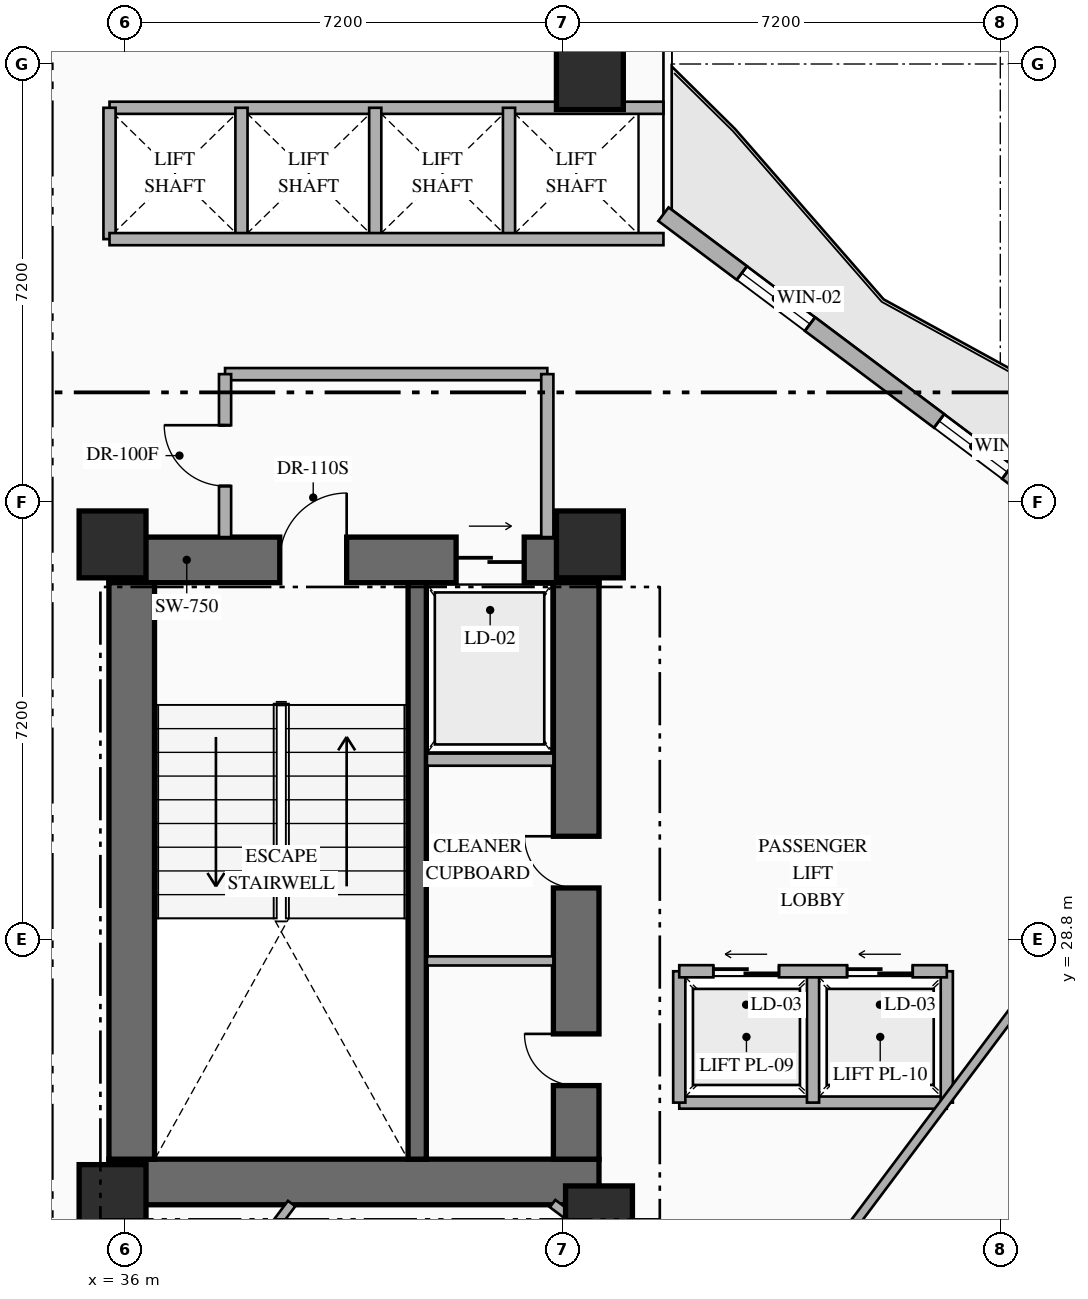
"""IFC4 building model, lengths in metres.
Left out: names, types, materials, properties, quantities, classifications, styles, units other than length and angle.
Written with IfcOpenShell. Run it as: python <this file> out.ifc"""

import sys

from ifc_helpers import new_model, si_unit, direction, frame, frame_2d, origin, origin_2d, place, context, subcontext, project, spatial, rectangle, extrude, element, fill, save


model = new_model("IFC4")
c1 = context("Model", 3, precision=1e-05, world=origin(), true_north=direction((0.0, 1.0)))
c2 = subcontext(c1, "Body", "Model", "MODEL_VIEW")
j1 = project(units=[si_unit("LENGTHUNIT", "METRE"), si_unit("PLANEANGLEUNIT", "RADIAN")], contexts=[c1])
p1 = place(None, origin())
s1 = spatial("IfcSite", under=j1, at=p1, CompositionType="ELEMENT")
p2 = place(p1, origin())
s2 = spatial("IfcBuilding", under=s1, at=p2, CompositionType="ELEMENT")
p3 = place(p2, frame((0.0, 0.0, 66.75)))
s3 = spatial("IfcBuildingStorey", under=s2, at=p3, CompositionType="ELEMENT", Elevation=66.75)
p4 = place(p3, frame((35.74, 24.815, 0.0), z_axis=(0.0, 0.0, 1.0), x_axis=(1.0, 0.0, 0.0)))
e1 = element("IfcWall", 1, at=p4, inside=s3, PredefinedType="SHEAR", context=c2, shape_type="SweptSolid", body=[
    extrude(rectangle(XDim=8.06, YDim=0.75, at=frame_2d((4.03, 0.0))), origin(), (0.0, 0.0, 1.0), 3.35),
])
p5 = place(p3, frame((35.74, 35.045, 0.0), z_axis=(0.0, 0.0, 1.0), x_axis=(1.0, 0.0, 0.0)))
e2 = element("IfcWall", 2, at=p5, inside=s3, PredefinedType="SHEAR", context=c2, shape_type="SweptSolid", body=[
    extrude(rectangle(XDim=8.06, YDim=0.75, at=frame_2d((4.03, 0.0))), origin(), (0.0, 0.0, 1.0), 3.35),
])
p6 = place(p5, frame((2.81, 0.0, 0.0)))
e3 = element("IfcOpeningElement", 3, at=p6, cuts=e2, PredefinedType="OPENING", context=c2, shape_type="SweptSolid", body=[
    extrude(rectangle(XDim=1.1, YDim=2.2, at=frame_2d((0.55, 1.1))), frame((0.0, 0.385, 0.0), z_axis=(0.0, -1.0, 0.0), x_axis=(1.0, 0.0, 0.0)), (0.0, 0.0, 1.0), 0.77),
])
p7 = place(p5, frame((5.71, 0.0, 0.0)))
e4 = element("IfcOpeningElement", 4, at=p7, cuts=e2, PredefinedType="OPENING", context=c2, shape_type="SweptSolid", body=[
    extrude(rectangle(XDim=1.12, YDim=2.15, at=frame_2d((0.56, 1.075))), frame((0.0, 0.385, 0.0), z_axis=(0.0, -1.0, 0.0), x_axis=(1.0, 0.0, 0.0)), (0.0, 0.0, 1.0), 0.77),
])
p8 = place(p3, frame((36.115, 25.19, 0.0), z_axis=(0.0, 0.0, 1.0), x_axis=(0.0, 1.0, 0.0)))
e5 = element("IfcWall", 5, at=p8, inside=s3, PredefinedType="SHEAR", context=c2, shape_type="SweptSolid", body=[
    extrude(rectangle(XDim=9.48, YDim=0.75, at=frame_2d((4.74, 0.0))), origin(), (0.0, 0.0, 1.0), 3.35),
])
p9 = place(p3, frame((43.425, 25.19, 0.0), z_axis=(0.0, 0.0, 1.0), x_axis=(0.0, 1.0, 0.0)))
e6 = element("IfcWall", 6, at=p9, inside=s3, PredefinedType="SHEAR", context=c2, shape_type="SweptSolid", body=[
    extrude(rectangle(XDim=9.48, YDim=0.75, at=frame_2d((4.74, 0.0))), origin(), (0.0, 0.0, 1.0), 3.35),
])
p10 = place(p9, frame((1.21, 0.0, 0.0)))
e7 = element("IfcOpeningElement", 7, at=p10, cuts=e6, PredefinedType="OPENING", context=c2, shape_type="SweptSolid", body=[
    extrude(rectangle(XDim=0.85, YDim=2.08, at=frame_2d((0.425, 1.04))), frame((0.0, 0.385, 0.0), z_axis=(0.0, -1.0, 0.0), x_axis=(1.0, 0.0, 0.0)), (0.0, 0.0, 1.0), 0.77),
])
p11 = place(p9, frame((4.46, 0.0, 0.0)))
e8 = element("IfcOpeningElement", 8, at=p11, cuts=e6, PredefinedType="OPENING", context=c2, shape_type="SweptSolid", body=[
    extrude(rectangle(XDim=0.85, YDim=2.08, at=frame_2d((0.425, 1.04))), frame((0.0, 0.385, 0.0), z_axis=(0.0, -1.0, 0.0), x_axis=(1.0, 0.0, 0.0)), (0.0, 0.0, 1.0), 0.77),
])
p12 = place(p3, frame((40.81, 25.19, 0.0), z_axis=(0.0, 0.0, 1.0), x_axis=(0.0, 1.0, 0.0)))
e9 = element("IfcWall", 9, at=p12, inside=s3, PredefinedType="SHEAR", context=c2, shape_type="SweptSolid", body=[
    extrude(rectangle(XDim=9.48, YDim=0.3, at=frame_2d((4.74, 0.0))), origin(), (0.0, 0.0, 1.0), 3.35),
])
for number, where, z_axis, x_axis in (
    (10, (35.8, 24.55, 0.0), (0.0, 0.0, 1.0), (1.0, 0.0, 0.0)),
    (11, (43.8, 24.2, 0.0), (0.0, 0.0, 1.0), (1.0, 0.0, 0.0)),
    (12, (35.8, 35.3, 0.0), (0.0, 0.0, 1.0), (1.0, 0.0, 0.0)),
    (13, (43.65, 35.3, 0.0), (0.0, 0.0, 1.0), (1.0, 0.0, 0.0)),
    (14, (43.65, 43.0, 0.0), (0.0, 0.0, 1.0), (1.0, 0.0, 0.0)),
):
    element("IfcColumn", number, at=place(p3, frame(where, z_axis=z_axis, x_axis=x_axis)), inside=s3, PredefinedType="COLUMN", context=c2, shape_type="SweptSolid", body=[
        extrude(rectangle(XDim=1.1, YDim=1.1, at=origin_2d()), origin(), (0.0, 0.0, 1.0), 3.35),
    ])
p13 = place(p3, frame((44.86, 40.73, 0.0), z_axis=(0.0, 0.0, 1.0), x_axis=(0.800006902154, -0.599990797017, 0.0)))
e15 = element("IfcWall", 15, at=p13, inside=s3, PredefinedType="STANDARD", context=c2, shape_type="SweptSolid", body=[
    extrude(rectangle(XDim=29.712, YDim=0.28, at=frame_2d((14.856, 0.0))), origin(), (0.0, 0.0, 1.0), 3.09),
])
p14 = place(p13, frame((14.249, 0.0, 0.0)))
e16 = element("IfcOpeningElement", 16, at=p14, cuts=e15, PredefinedType="OPENING", context=c2, shape_type="SweptSolid", body=[
    extrude(rectangle(XDim=1.1, YDim=2.2, at=frame_2d((0.55, 1.1))), frame((0.0, 0.15, 0.0), z_axis=(0.0, -1.0, 0.0), x_axis=(1.0, 0.0, 0.0)), (0.0, 0.0, 1.0), 0.3),
])
p15 = place(p13, frame((1.612, 0.0, 0.85)))
e17 = element("IfcOpeningElement", 17, at=p15, cuts=e15, PredefinedType="OPENING", context=c2, shape_type="SweptSolid", body=[
    extrude(rectangle(XDim=1.4, YDim=1.8, at=frame_2d((0.7, 0.9))), frame((0.0, 0.15, 0.0), z_axis=(0.0, -1.0, 0.0), x_axis=(1.0, 0.0, 0.0)), (0.0, 0.0, 1.0), 0.3),
])
p16 = place(p13, frame((5.667, 0.0, 0.85)))
e18 = element("IfcOpeningElement", 18, at=p16, cuts=e15, PredefinedType="OPENING", context=c2, shape_type="SweptSolid", body=[
    extrude(rectangle(XDim=1.4, YDim=1.8, at=frame_2d((0.7, 0.9))), frame((0.0, 0.15, 0.0), z_axis=(0.0, -1.0, 0.0), x_axis=(1.0, 0.0, 0.0)), (0.0, 0.0, 1.0), 0.3),
])
p17 = place(p13, frame((9.912, 0.0, 0.85)))
e19 = element("IfcOpeningElement", 19, at=p17, cuts=e15, PredefinedType="OPENING", context=c2, shape_type="SweptSolid", body=[
    extrude(rectangle(XDim=1.4, YDim=1.8, at=frame_2d((0.7, 0.9))), frame((0.0, 0.15, 0.0), z_axis=(0.0, -1.0, 0.0), x_axis=(1.0, 0.0, 0.0)), (0.0, 0.0, 1.0), 0.3),
])
p18 = place(p13, frame((19.743, 0.0, 0.85)))
e20 = element("IfcOpeningElement", 20, at=p18, cuts=e15, PredefinedType="OPENING", context=c2, shape_type="SweptSolid", body=[
    extrude(rectangle(XDim=1.4, YDim=1.8, at=frame_2d((0.7, 0.9))), frame((0.0, 0.15, 0.0), z_axis=(0.0, -1.0, 0.0), x_axis=(1.0, 0.0, 0.0)), (0.0, 0.0, 1.0), 0.3),
])
p19 = place(p13, frame((22.645, 0.0, 0.85)))
e21 = element("IfcOpeningElement", 21, at=p19, cuts=e15, PredefinedType="OPENING", context=c2, shape_type="SweptSolid", body=[
    extrude(rectangle(XDim=1.4, YDim=1.8, at=frame_2d((0.7, 0.9))), frame((0.0, 0.15, 0.0), z_axis=(0.0, -1.0, 0.0), x_axis=(1.0, 0.0, 0.0)), (0.0, 0.0, 1.0), 0.3),
])
p20 = place(p13, frame((26.7, 0.0, 0.85)))
e22 = element("IfcOpeningElement", 22, at=p20, cuts=e15, PredefinedType="OPENING", context=c2, shape_type="SweptSolid", body=[
    extrude(rectangle(XDim=1.4, YDim=1.8, at=frame_2d((0.7, 0.9))), frame((0.0, 0.15, 0.0), z_axis=(0.0, -1.0, 0.0), x_axis=(1.0, 0.0, 0.0)), (0.0, 0.0, 1.0), 0.3),
])
p21 = place(p3, frame((40.97, 31.76, 0.0), z_axis=(0.0, 0.0, 1.0), x_axis=(1.0, 0.0, 0.0)))
e23 = element("IfcWall", 23, at=p21, inside=s3, PredefinedType="STANDARD", context=c2, shape_type="SweptSolid", body=[
    extrude(rectangle(XDim=2.08, YDim=0.2, at=frame_2d((1.04, 0.0))), origin(), (0.0, 0.0, 1.0), 3.09),
])
p22 = place(p3, frame((40.97, 28.45, 0.0), z_axis=(0.0, 0.0, 1.0), x_axis=(1.0, 0.0, 0.0)))
e24 = element("IfcWall", 24, at=p22, inside=s3, PredefinedType="PARTITIONING", context=c2, shape_type="SweptSolid", body=[
    extrude(rectangle(XDim=2.08, YDim=0.15, at=frame_2d((1.04, 0.0))), origin(), (0.0, 0.0, 1.0), 3.09),
])
p23 = place(p3, frame((37.65, 38.1, 0.0), z_axis=(0.0, 0.0, 1.0), x_axis=(1.0, 0.0, 0.0)))
e25 = element("IfcWall", 25, at=p23, inside=s3, PredefinedType="STANDARD", context=c2, shape_type="SweptSolid", body=[
    extrude(rectangle(XDim=5.3, YDim=0.2, at=frame_2d((2.65, 0.0))), origin(), (0.0, 0.0, 1.0), 3.09),
])
p24 = place(p3, frame((42.95, 35.42, 0.0), z_axis=(0.0, 0.0, 1.0), x_axis=(0.0, 1.0, 0.0)))
e26 = element("IfcWall", 26, at=p24, inside=s3, PredefinedType="STANDARD", context=c2, shape_type="SweptSolid", body=[
    extrude(rectangle(XDim=2.68, YDim=0.2, at=frame_2d((1.34, 0.0))), origin(), (0.0, 0.0, 1.0), 3.09),
])
p25 = place(p3, frame((37.65, 35.42, 0.0), z_axis=(0.0, 0.0, 1.0), x_axis=(0.0, 1.0, 0.0)))
e27 = element("IfcWall", 27, at=p25, inside=s3, PredefinedType="STANDARD", context=c2, shape_type="SweptSolid", body=[
    extrude(rectangle(XDim=2.68, YDim=0.2, at=frame_2d((1.34, 0.0))), origin(), (0.0, 0.0, 1.0), 3.09),
])
p26 = place(p25, frame((0.84, 0.0, 0.0)))
e28 = element("IfcOpeningElement", 28, at=p26, cuts=e27, PredefinedType="OPENING", context=c2, shape_type="SweptSolid", body=[
    extrude(rectangle(XDim=1.0, YDim=2.2, at=frame_2d((0.5, 1.1))), frame((0.0, 0.11, 0.0), z_axis=(0.0, -1.0, 0.0), x_axis=(1.0, 0.0, 0.0)), (0.0, 0.0, 1.0), 0.22),
])
p27 = place(p3, frame((35.75, 42.48, 0.0), z_axis=(0.0, 0.0, 1.0), x_axis=(1.0, 0.0, 0.0)))
e29 = element("IfcWall", 29, at=p27, inside=s3, PredefinedType="STANDARD", context=c2, shape_type="SweptSolid", body=[
    extrude(rectangle(XDim=9.11, YDim=0.2, at=frame_2d((4.555, 0.0))), origin(), (0.0, 0.0, 1.0), 3.09),
])
for number, where, z_axis, x_axis in (
    (30, (35.75, 40.32, 0.0), (0.0, 0.0, 1.0), (0.0, 1.0, 0.0)),
    (31, (37.92, 40.32, 0.0), (0.0, 0.0, 1.0), (0.0, 1.0, 0.0)),
    (32, (40.12, 40.32, 0.0), (0.0, 0.0, 1.0), (0.0, 1.0, 0.0)),
    (33, (42.32, 40.32, 0.0), (0.0, 0.0, 1.0), (0.0, 1.0, 0.0)),
):
    element("IfcWall", number, at=place(p3, frame(where, z_axis=z_axis, x_axis=x_axis)), inside=s3, PredefinedType="STANDARD", context=c2, shape_type="SweptSolid", body=[
        extrude(rectangle(XDim=2.16, YDim=0.2, at=frame_2d((1.08, 0.0))), origin(), (0.0, 0.0, 1.0), 3.09),
    ])
p28 = place(p3, frame((35.75, 40.32, 0.0), z_axis=(0.0, 0.0, 1.0), x_axis=(1.0, 0.0, 0.0)))
e34 = element("IfcWall", 34, at=p28, inside=s3, PredefinedType="STANDARD", context=c2, shape_type="SweptSolid", body=[
    extrude(rectangle(XDim=9.11, YDim=0.2, at=frame_2d((4.555, 0.0))), origin(), (0.0, 0.0, 1.0), 3.09),
])
p29 = place(p3, frame((45.12, 26.12, 0.0), z_axis=(0.0, 0.0, 1.0), x_axis=(1.0, 0.0, 0.0)))
e35 = element("IfcWall", 35, at=p29, inside=s3, PredefinedType="STANDARD", context=c2, shape_type="SweptSolid", body=[
    extrude(rectangle(XDim=4.4, YDim=0.2, at=frame_2d((2.2, 0.0))), origin(), (0.0, 0.0, 1.0), 3.09),
])
for number, where, z_axis, x_axis in (
    (36, (45.12, 26.12, 0.0), (0.0, 0.0, 1.0), (0.0, 1.0, 0.0)),
    (37, (49.52, 26.12, 0.0), (0.0, 0.0, 1.0), (0.0, 1.0, 0.0)),
    (38, (47.32, 26.12, 0.0), (0.0, 0.0, 1.0), (0.0, 1.0, 0.0)),
):
    element("IfcWall", number, at=place(p3, frame(where, z_axis=z_axis, x_axis=x_axis)), inside=s3, PredefinedType="STANDARD", context=c2, shape_type="SweptSolid", body=[
        extrude(rectangle(XDim=2.16, YDim=0.2, at=frame_2d((1.08, 0.0))), origin(), (0.0, 0.0, 1.0), 3.09),
    ])
p30 = place(p3, frame((45.12, 28.28, 0.0), z_axis=(0.0, 0.0, 1.0), x_axis=(1.0, 0.0, 0.0)))
e39 = element("IfcWall", 39, at=p30, inside=s3, PredefinedType="STANDARD", context=c2, shape_type="SweptSolid", body=[
    extrude(rectangle(XDim=4.4, YDim=0.2, at=frame_2d((2.2, 0.0))), origin(), (0.0, 0.0, 1.0), 3.09),
])
p31 = place(p30, frame((0.56, 0.0, 0.0)))
e40 = element("IfcOpeningElement", 40, at=p31, cuts=e39, PredefinedType="OPENING", context=c2, shape_type="SweptSolid", body=[
    extrude(rectangle(XDim=1.08, YDim=2.15, at=frame_2d((0.54, 1.075))), frame((0.0, 0.11, 0.0), z_axis=(0.0, -1.0, 0.0), x_axis=(1.0, 0.0, 0.0)), (0.0, 0.0, 1.0), 0.22),
])
p32 = place(p30, frame((2.76, 0.0, 0.0)))
e41 = element("IfcOpeningElement", 41, at=p32, cuts=e39, PredefinedType="OPENING", context=c2, shape_type="SweptSolid", body=[
    extrude(rectangle(XDim=1.08, YDim=2.15, at=frame_2d((0.54, 1.075))), frame((0.0, 0.11, 0.0), z_axis=(0.0, -1.0, 0.0), x_axis=(1.0, 0.0, 0.0)), (0.0, 0.0, 1.0), 0.22),
])
p33 = place(p3, frame((43.037, 24.46, 0.0), z_axis=(0.0, 0.0, 1.0), x_axis=(0.799971872363, -0.600037501685, 0.0)))
e42 = element("IfcWall", 42, at=p33, inside=s3, PredefinedType="PARTITIONING", context=c2, shape_type="SweptSolid", body=[
    extrude(rectangle(XDim=4.167, YDim=0.15, at=frame_2d((2.083, 0.0))), origin(), (0.0, 0.0, 1.0), 2.425),
])
p34 = place(p33, frame((2.468, 0.0, 0.0)))
e43 = element("IfcOpeningElement", 43, at=p34, cuts=e42, PredefinedType="OPENING", context=c2, shape_type="SweptSolid", body=[
    extrude(rectangle(XDim=0.95, YDim=2.15, at=frame_2d((0.475, 1.075))), frame((0.0, 0.085, 0.0), z_axis=(0.0, -1.0, 0.0), x_axis=(1.0, 0.0, 0.0)), (0.0, 0.0, 1.0), 0.17),
])
p35 = place(p3, frame((33.384, 17.312, 0.0), z_axis=(0.0, 0.0, 1.0), x_axis=(0.600008743659, 0.799993442181, 0.0)))
e44 = element("IfcWall", 44, at=p35, inside=s3, PredefinedType="PARTITIONING", context=c2, shape_type="SweptSolid", body=[
    extrude(rectangle(XDim=8.935, YDim=0.15, at=frame_2d((4.468, 0.0))), origin(), (0.0, 0.0, 1.0), 3.09),
])
p36 = place(p3, frame((47.87, 23.96, 0.0), z_axis=(0.0, 0.0, 1.0), x_axis=(0.599996617946, 0.80000253653, 0.0)))
e45 = element("IfcWall", 45, at=p36, inside=s3, PredefinedType="PARTITIONING", context=c2, shape_type="SweptSolid", body=[
    extrude(rectangle(XDim=11.55, YDim=0.15, at=frame_2d((5.775, 0.0))), origin(), (0.0, 0.0, 1.0), 3.09),
])
p37 = place(p15, origin())
e46 = element("IfcWindow", 46, at=p37, inside=s3, PartitioningType="SINGLE_PANEL", PredefinedType="WINDOW", context=c2, shape_type="SweptSolid", body=[
    extrude(rectangle(XDim=1.4, YDim=1.8, at=frame_2d((0.7, 0.9))), frame((0.0, 0.03, 0.0), z_axis=(0.0, -1.0, 0.0), x_axis=(1.0, 0.0, 0.0)), (0.0, 0.0, 1.0), 0.06),
])
fill(e17, e46)
p38 = place(p16, origin())
e47 = element("IfcWindow", 47, at=p38, inside=s3, PartitioningType="SINGLE_PANEL", PredefinedType="WINDOW", context=c2, shape_type="SweptSolid", body=[
    extrude(rectangle(XDim=1.4, YDim=1.8, at=frame_2d((0.7, 0.9))), frame((0.0, 0.03, 0.0), z_axis=(0.0, -1.0, 0.0), x_axis=(1.0, 0.0, 0.0)), (0.0, 0.0, 1.0), 0.06),
])
fill(e18, e47)
p39 = place(p6, origin())
e48 = element("IfcDoor", 48, at=p39, inside=s3, OperationType="SINGLE_SWING_RIGHT", PredefinedType="DOOR", context=c2, shape_type="SweptSolid", body=[
    extrude(rectangle(XDim=1.1, YDim=2.2, at=frame_2d((0.55, 1.1))), frame((0.0, 0.025, 0.0), z_axis=(0.0, -1.0, 0.0), x_axis=(1.0, 0.0, 0.0)), (0.0, 0.0, 1.0), 0.05),
])
fill(e3, e48)
p40 = place(p7, origin())
e49 = element("IfcDoor", 49, at=p40, inside=s3, OperationType="SLIDING_TO_RIGHT", PredefinedType="USERDEFINED", context=c2, shape_type="SweptSolid", body=[
    extrude(rectangle(XDim=1.12, YDim=2.15, at=frame_2d((0.56, 1.075))), frame((0.0, 0.025, 0.0), z_axis=(0.0, -1.0, 0.0), x_axis=(1.0, 0.0, 0.0)), (0.0, 0.0, 1.0), 0.05),
])
fill(e4, e49)
p41 = place(p10, origin())
e50 = element("IfcDoor", 50, at=p41, inside=s3, OperationType="SINGLE_SWING_RIGHT", PredefinedType="DOOR", context=c2, shape_type="SweptSolid", body=[
    extrude(rectangle(XDim=0.85, YDim=2.08, at=frame_2d((0.425, 1.04))), frame((0.0, 0.025, 0.0), z_axis=(0.0, -1.0, 0.0), x_axis=(1.0, 0.0, 0.0)), (0.0, 0.0, 1.0), 0.05),
])
fill(e7, e50)
p42 = place(p11, origin())
e51 = element("IfcDoor", 51, at=p42, inside=s3, OperationType="SINGLE_SWING_RIGHT", PredefinedType="DOOR", context=c2, shape_type="SweptSolid", body=[
    extrude(rectangle(XDim=0.85, YDim=2.08, at=frame_2d((0.425, 1.04))), frame((0.0, 0.025, 0.0), z_axis=(0.0, -1.0, 0.0), x_axis=(1.0, 0.0, 0.0)), (0.0, 0.0, 1.0), 0.05),
])
fill(e8, e51)
p43 = place(p26, origin())
e52 = element("IfcDoor", 52, at=p43, inside=s3, OperationType="SINGLE_SWING_RIGHT", PredefinedType="DOOR", context=c2, shape_type="SweptSolid", body=[
    extrude(rectangle(XDim=1.0, YDim=2.2, at=frame_2d((0.5, 1.1))), frame((0.0, 0.025, 0.0), z_axis=(0.0, -1.0, 0.0), x_axis=(1.0, 0.0, 0.0)), (0.0, 0.0, 1.0), 0.05),
])
fill(e28, e52)
p44 = place(p31, origin())
e53 = element("IfcDoor", 53, at=p44, inside=s3, OperationType="SLIDING_TO_LEFT", PredefinedType="USERDEFINED", context=c2, shape_type="SweptSolid", body=[
    extrude(rectangle(XDim=1.08, YDim=2.15, at=frame_2d((0.54, 1.075))), frame((0.0, 0.025, 0.0), z_axis=(0.0, -1.0, 0.0), x_axis=(1.0, 0.0, 0.0)), (0.0, 0.0, 1.0), 0.05),
])
fill(e40, e53)
p45 = place(p32, origin())
e54 = element("IfcDoor", 54, at=p45, inside=s3, OperationType="SLIDING_TO_LEFT", PredefinedType="USERDEFINED", context=c2, shape_type="SweptSolid", body=[
    extrude(rectangle(XDim=1.08, YDim=2.15, at=frame_2d((0.54, 1.075))), frame((0.0, 0.025, 0.0), z_axis=(0.0, -1.0, 0.0), x_axis=(1.0, 0.0, 0.0)), (0.0, 0.0, 1.0), 0.05),
])
fill(e41, e54)
save(model, sys.argv[1])
